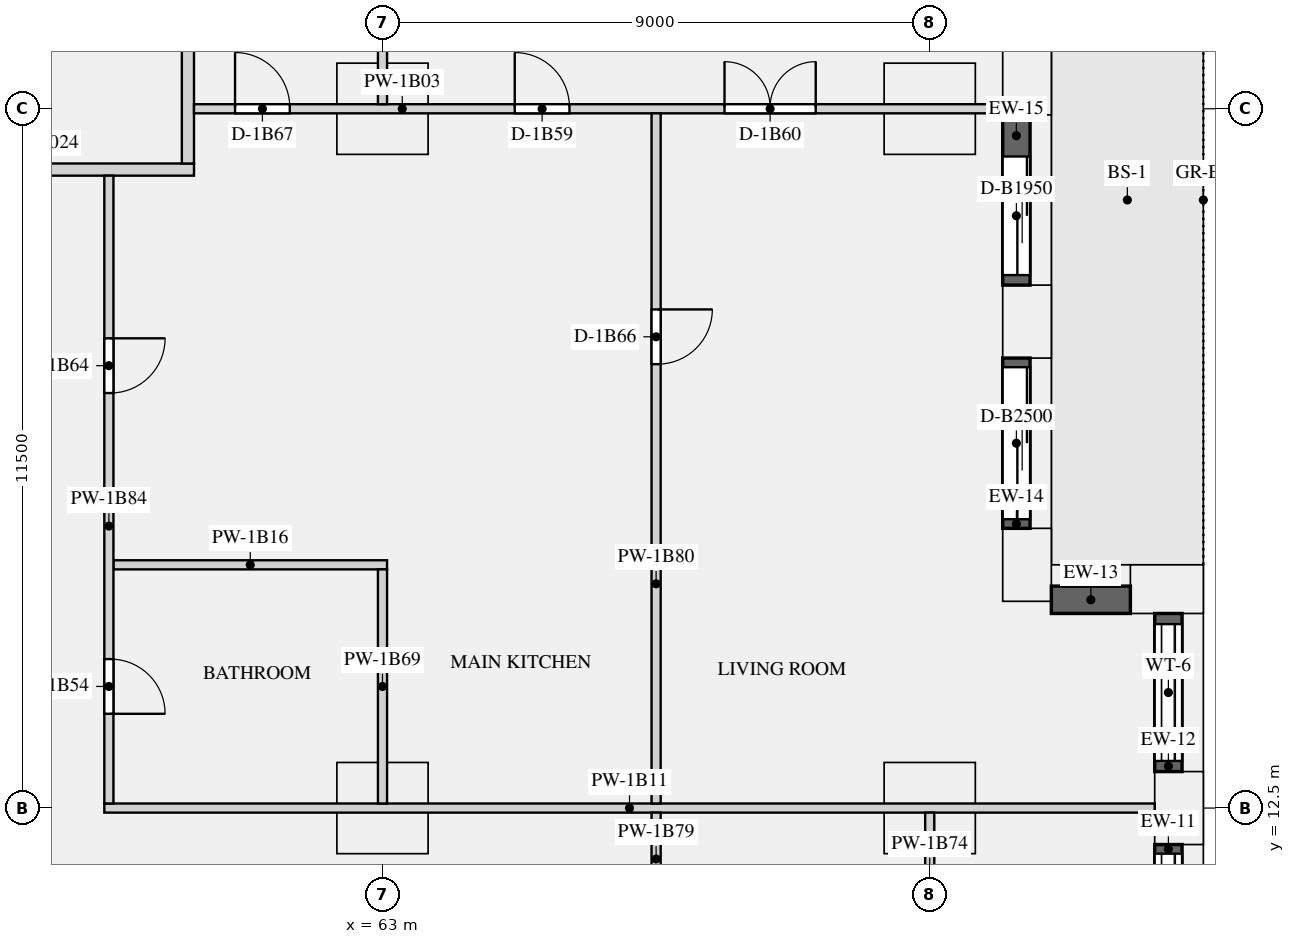
"""IFC4 building model, lengths in metres.
Left out: names, types, materials, properties, quantities, classifications, styles, units other than length and angle.
Written with IfcOpenShell. Run it as: python <this file> out.ifc"""

import sys

from ifc_helpers import new_model, si_unit, direction, frame, frame_2d, origin, origin_2d, place, context, subcontext, project, spatial, rectangle, extrude, element, fill, save


model = new_model("IFC4")
c1 = context("Model", 3, precision=1e-05, world=origin(), true_north=direction((0.0, 1.0)))
c2 = subcontext(c1, "Body", "Model", "MODEL_VIEW")
j1 = project(units=[si_unit("LENGTHUNIT", "METRE"), si_unit("PLANEANGLEUNIT", "RADIAN")], contexts=[c1])
p1 = place(None, origin())
s1 = spatial("IfcSite", under=j1, at=p1, CompositionType="ELEMENT")
p2 = place(p1, origin())
s2 = spatial("IfcBuilding", under=s1, at=p2, CompositionType="ELEMENT")
p3 = place(p2, frame((0.0, 0.0, 28.95)))
s3 = spatial("IfcBuildingStorey", under=s2, at=p3, CompositionType="ELEMENT", Elevation=28.95)
for number, where, z_axis, x_axis in (
    (1, (76.1, 12.5, 0.0), (0.0, 0.0, 1.0), (0.0, 1.0, 0.0)),
    (2, (75.9, 16.1, 0.0), (0.0, 0.0, 1.0), (-1.0, 0.0, 0.0)),
    (3, (73.6, 16.5, 0.0), (0.0, 0.0, 1.0), (0.0, 1.0, 0.0)),
    (4, (73.6, 20.5, 0.0), (0.0, 0.0, 1.0), (0.0, 1.0, 0.0)),
    (5, (73.6, 24.5, 0.0), (0.0, 0.0, 1.0), (0.0, 1.0, 0.0)),
):
    element("IfcColumn", number, at=place(p3, frame(where, z_axis=z_axis, x_axis=x_axis)), inside=s3, PredefinedType="USERDEFINED", context=c2, shape_type="SweptSolid", body=[
        extrude(rectangle(XDim=1.2, YDim=0.8, at=origin_2d()), origin(), (0.0, 0.0, 1.0), 3.15),
    ])
for number, where, z_axis, x_axis in (
    (6, (63.0, 24.0, 0.0), (0.0, 0.0, 1.0), (1.0, 0.0, 0.0)),
    (7, (72.0, 24.0, 0.0), (0.0, 0.0, 1.0), (1.0, 0.0, 0.0)),
    (8, (63.0, 12.5, 0.0), (0.0, 0.0, 1.0), (1.0, 0.0, 0.0)),
    (9, (72.0, 12.5, 0.0), (0.0, 0.0, 1.0), (1.0, 0.0, 0.0)),
):
    element("IfcColumn", number, at=place(p3, frame(where, z_axis=z_axis, x_axis=x_axis)), inside=s3, PredefinedType="COLUMN", context=c2, shape_type="SweptSolid", body=[
        extrude(rectangle(XDim=1.5, YDim=1.5, at=origin_2d()), origin(), (0.0, 0.0, 1.0), 3.15),
    ])
p4 = place(p3, frame((75.925, 9.1, 0.9), z_axis=(0.0, 0.0, 1.0), x_axis=(0.0, 1.0, 0.0)))
e10 = element("IfcWall", 10, at=p4, inside=s3, PredefinedType="SOLIDWALL", context=c2, shape_type="SweptSolid", body=[
    extrude(rectangle(XDim=2.8, YDim=0.45, at=frame_2d((1.4, 0.0))), origin(), (0.0, 0.0, 1.0), 1.93),
])
p5 = place(p4, frame((0.15, 0.0, 0.15)))
e11 = element("IfcOpeningElement", 11, at=p5, cuts=e10, PredefinedType="OPENING", context=c2, shape_type="SweptSolid", body=[
    extrude(rectangle(XDim=2.5, YDim=1.5, at=frame_2d((1.25, 0.75))), frame((0.0, 0.235, 0.0), z_axis=(0.0, -1.0, 0.0), x_axis=(1.0, 0.0, 0.0)), (0.0, 0.0, 1.0), 0.47),
])
p6 = place(p3, frame((75.925, 13.1, 0.9), z_axis=(0.0, 0.0, 1.0), x_axis=(0.0, 1.0, 0.0)))
e12 = element("IfcWall", 12, at=p6, inside=s3, PredefinedType="SOLIDWALL", context=c2, shape_type="SweptSolid", body=[
    extrude(rectangle(XDim=2.6, YDim=0.45, at=frame_2d((1.3, 0.0))), origin(), (0.0, 0.0, 1.0), 1.93),
])
p7 = place(p6, frame((0.175, 0.0, 0.15)))
e13 = element("IfcOpeningElement", 13, at=p7, cuts=e12, PredefinedType="OPENING", context=c2, shape_type="SweptSolid", body=[
    extrude(rectangle(XDim=2.25, YDim=1.5, at=frame_2d((1.125, 0.75))), frame((0.0, 0.235, 0.0), z_axis=(0.0, -1.0, 0.0), x_axis=(1.0, 0.0, 0.0)), (0.0, 0.0, 1.0), 0.47),
])
p8 = place(p3, frame((75.3, 15.925, 0.9), z_axis=(0.0, 0.0, 1.0), x_axis=(-1.0, 0.0, 0.0)))
e14 = element("IfcWall", 14, at=p8, inside=s3, PredefinedType="SOLIDWALL", context=c2, shape_type="SweptSolid", body=[
    extrude(rectangle(XDim=1.3, YDim=0.45, at=frame_2d((0.65, 0.0))), origin(), (0.0, 0.0, 1.0), 1.93),
])
p9 = place(p3, frame((73.425, 17.1, 0.0), z_axis=(0.0, 0.0, 1.0), x_axis=(0.0, 1.0, 0.0)))
e15 = element("IfcWall", 15, at=p9, inside=s3, PredefinedType="SOLIDWALL", context=c2, shape_type="SweptSolid", body=[
    extrude(rectangle(XDim=2.8, YDim=0.45, at=frame_2d((1.4, 0.0))), origin(), (0.0, 0.0, 1.0), 2.83),
])
p10 = place(p9, frame((0.15, 0.0, 0.0)))
e16 = element("IfcOpeningElement", 16, at=p10, cuts=e15, PredefinedType="OPENING", context=c2, shape_type="SweptSolid", body=[
    extrude(rectangle(XDim=2.5, YDim=2.3, at=frame_2d((1.25, 1.15))), frame((0.0, 0.235, 0.0), z_axis=(0.0, -1.0, 0.0), x_axis=(1.0, 0.0, 0.0)), (0.0, 0.0, 1.0), 0.47),
])
p11 = place(p3, frame((73.425, 21.1, 0.0), z_axis=(0.0, 0.0, 1.0), x_axis=(0.0, 1.0, 0.0)))
e17 = element("IfcWall", 17, at=p11, inside=s3, PredefinedType="SOLIDWALL", context=c2, shape_type="SweptSolid", body=[
    extrude(rectangle(XDim=2.8, YDim=0.45, at=frame_2d((1.4, 0.0))), origin(), (0.0, 0.0, 1.0), 2.83),
])
p12 = place(p11, frame((0.165, 0.0, 0.0)))
e18 = element("IfcOpeningElement", 18, at=p12, cuts=e17, PredefinedType="OPENING", context=c2, shape_type="SweptSolid", body=[
    extrude(rectangle(XDim=1.95, YDim=2.3, at=frame_2d((0.975, 1.15))), frame((0.0, 0.235, 0.0), z_axis=(0.0, -1.0, 0.0), x_axis=(1.0, 0.0, 0.0)), (0.0, 0.0, 1.0), 0.47),
])
p13 = place(p3, frame((54.9, 23.0, 0.0), z_axis=(0.0, 0.0, 1.0), x_axis=(1.0, 0.0, 0.0)))
e19 = element("IfcWall", 19, at=p13, inside=s3, PredefinedType="PARTITIONING", context=c2, shape_type="SweptSolid", body=[
    extrude(rectangle(XDim=5.0, YDim=0.2, at=frame_2d((2.5, 0.0))), origin(), (0.0, 0.0, 1.0), 2.83),
])
p14 = place(p3, frame((59.8, 23.1, 0.0), z_axis=(0.0, 0.0, 1.0), x_axis=(0.0, 1.0, 0.0)))
e20 = element("IfcWall", 20, at=p14, inside=s3, PredefinedType="PARTITIONING", context=c2, shape_type="SweptSolid", body=[
    extrude(rectangle(XDim=3.9, YDim=0.2, at=frame_2d((1.95, 0.0))), origin(), (0.0, 0.0, 1.0), 2.83),
])
p15 = place(p3, frame((59.9, 24.0, 0.0), z_axis=(0.0, 0.0, 1.0), x_axis=(1.0, 0.0, 0.0)))
e21 = element("IfcWall", 21, at=p15, inside=s3, PredefinedType="PARTITIONING", context=c2, shape_type="SweptSolid", body=[
    extrude(rectangle(XDim=13.3, YDim=0.15, at=frame_2d((6.65, 0.0))), origin(), (0.0, 0.0, 1.0), 2.83),
])
p16 = place(p15, frame((5.275, 0.0, 0.0)))
e22 = element("IfcOpeningElement", 22, at=p16, cuts=e21, PredefinedType="OPENING", context=c2, shape_type="SweptSolid", body=[
    extrude(rectangle(XDim=0.9, YDim=2.1, at=frame_2d((0.45, 1.05))), frame((0.0, 0.085, 0.0), z_axis=(0.0, -1.0, 0.0), x_axis=(1.0, 0.0, 0.0)), (0.0, 0.0, 1.0), 0.17),
])
p17 = place(p15, frame((8.725, 0.0, 0.0)))
e23 = element("IfcOpeningElement", 23, at=p17, cuts=e21, PredefinedType="OPENING", context=c2, shape_type="SweptSolid", body=[
    extrude(rectangle(XDim=1.5, YDim=2.1, at=frame_2d((0.75, 1.05))), frame((0.0, 0.085, 0.0), z_axis=(0.0, -1.0, 0.0), x_axis=(1.0, 0.0, 0.0)), (0.0, 0.0, 1.0), 0.17),
])
p18 = place(p15, frame((0.675, 0.0, 0.0)))
e24 = element("IfcOpeningElement", 24, at=p18, cuts=e21, PredefinedType="OPENING", context=c2, shape_type="SweptSolid", body=[
    extrude(rectangle(XDim=0.9, YDim=2.1, at=frame_2d((0.45, 1.05))), frame((0.0, 0.085, 0.0), z_axis=(0.0, -1.0, 0.0), x_axis=(1.0, 0.0, 0.0)), (0.0, 0.0, 1.0), 0.17),
])
p19 = place(p3, frame((58.425, 12.5, 0.0), z_axis=(0.0, 0.0, 1.0), x_axis=(1.0, 0.0, 0.0)))
e25 = element("IfcWall", 25, at=p19, inside=s3, PredefinedType="PARTITIONING", context=c2, shape_type="SweptSolid", body=[
    extrude(rectangle(XDim=17.275, YDim=0.15, at=frame_2d((8.637, 0.0))), origin(), (0.0, 0.0, 1.0), 2.83),
])
p20 = place(p3, frame((58.575, 16.5, 0.0), z_axis=(0.0, 0.0, 1.0), x_axis=(1.0, 0.0, 0.0)))
e26 = element("IfcWall", 26, at=p20, inside=s3, PredefinedType="PARTITIONING", context=c2, shape_type="SweptSolid", body=[
    extrude(rectangle(XDim=4.5, YDim=0.15, at=frame_2d((2.25, 0.0))), origin(), (0.0, 0.0, 1.0), 2.83),
])
p21 = place(p3, frame((63.0, 12.575, 0.0), z_axis=(0.0, 0.0, 1.0), x_axis=(0.0, 1.0, 0.0)))
e27 = element("IfcWall", 27, at=p21, inside=s3, PredefinedType="PARTITIONING", context=c2, shape_type="SweptSolid", body=[
    extrude(rectangle(XDim=3.85, YDim=0.15, at=frame_2d((1.925, 0.0))), origin(), (0.0, 0.0, 1.0), 2.83),
])
p22 = place(p3, frame((63.0, 24.075, 0.0), z_axis=(0.0, 0.0, 1.0), x_axis=(0.0, 1.0, 0.0)))
e28 = element("IfcWall", 28, at=p22, inside=s3, PredefinedType="PARTITIONING", context=c2, shape_type="SweptSolid", body=[
    extrude(rectangle(XDim=4.35, YDim=0.15, at=frame_2d((2.175, 0.0))), origin(), (0.0, 0.0, 1.0), 2.83),
])
p23 = place(p22, frame((2.1, 0.0, 0.0)))
e29 = element("IfcOpeningElement", 29, at=p23, cuts=e28, PredefinedType="OPENING", context=c2, shape_type="SweptSolid", body=[
    extrude(rectangle(XDim=0.9, YDim=2.1, at=frame_2d((0.45, 1.05))), frame((0.0, 0.085, 0.0), z_axis=(0.0, -1.0, 0.0), x_axis=(1.0, 0.0, 0.0)), (0.0, 0.0, 1.0), 0.17),
])
p24 = place(p3, frame((72.0, 8.575, 0.0), z_axis=(0.0, 0.0, 1.0), x_axis=(0.0, 1.0, 0.0)))
e30 = element("IfcWall", 30, at=p24, inside=s3, PredefinedType="PARTITIONING", context=c2, shape_type="SweptSolid", body=[
    extrude(rectangle(XDim=3.85, YDim=0.15, at=frame_2d((1.925, 0.0))), origin(), (0.0, 0.0, 1.0), 2.83),
])
p25 = place(p24, frame((1.15, 0.0, 0.0)))
e31 = element("IfcOpeningElement", 31, at=p25, cuts=e30, PredefinedType="OPENING", context=c2, shape_type="SweptSolid", body=[
    extrude(rectangle(XDim=0.8, YDim=2.1, at=frame_2d((0.4, 1.05))), frame((0.0, 0.085, 0.0), z_axis=(0.0, -1.0, 0.0), x_axis=(1.0, 0.0, 0.0)), (0.0, 0.0, 1.0), 0.17),
])
p26 = place(p3, frame((67.5, 8.575, 0.0), z_axis=(0.0, 0.0, 1.0), x_axis=(0.0, 1.0, 0.0)))
e32 = element("IfcWall", 32, at=p26, inside=s3, PredefinedType="PARTITIONING", context=c2, shape_type="SweptSolid", body=[
    extrude(rectangle(XDim=3.85, YDim=0.15, at=frame_2d((1.925, 0.0))), origin(), (0.0, 0.0, 1.0), 2.83),
])
p27 = place(p26, frame((1.525, 0.0, 0.0)))
e33 = element("IfcOpeningElement", 33, at=p27, cuts=e32, PredefinedType="OPENING", context=c2, shape_type="SweptSolid", body=[
    extrude(rectangle(XDim=0.8, YDim=2.1, at=frame_2d((0.4, 1.05))), frame((0.0, 0.085, 0.0), z_axis=(0.0, -1.0, 0.0), x_axis=(1.0, 0.0, 0.0)), (0.0, 0.0, 1.0), 0.17),
])
p28 = place(p3, frame((67.5, 12.575, 0.0), z_axis=(0.0, 0.0, 1.0), x_axis=(0.0, 1.0, 0.0)))
e34 = element("IfcWall", 34, at=p28, inside=s3, PredefinedType="PARTITIONING", context=c2, shape_type="SweptSolid", body=[
    extrude(rectangle(XDim=11.35, YDim=0.15, at=frame_2d((5.675, 0.0))), origin(), (0.0, 0.0, 1.0), 2.83),
])
p29 = place(p28, frame((7.225, 0.0, 0.0)))
e35 = element("IfcOpeningElement", 35, at=p29, cuts=e34, PredefinedType="OPENING", context=c2, shape_type="SweptSolid", body=[
    extrude(rectangle(XDim=0.9, YDim=2.1, at=frame_2d((0.45, 1.05))), frame((0.0, 0.085, 0.0), z_axis=(0.0, -1.0, 0.0), x_axis=(1.0, 0.0, 0.0)), (0.0, 0.0, 1.0), 0.17),
])
p30 = place(p3, frame((58.5, 12.575, 0.0), z_axis=(0.0, 0.0, 1.0), x_axis=(0.0, 1.0, 0.0)))
e36 = element("IfcWall", 36, at=p30, inside=s3, PredefinedType="PARTITIONING", context=c2, shape_type="SweptSolid", body=[
    extrude(rectangle(XDim=10.325, YDim=0.15, at=frame_2d((5.163, 0.0))), origin(), (0.0, 0.0, 1.0), 2.83),
])
p31 = place(p30, frame((1.475, 0.0, 0.0)))
e37 = element("IfcOpeningElement", 37, at=p31, cuts=e36, PredefinedType="OPENING", context=c2, shape_type="SweptSolid", body=[
    extrude(rectangle(XDim=0.9, YDim=2.1, at=frame_2d((0.45, 1.05))), frame((0.0, 0.085, 0.0), z_axis=(0.0, -1.0, 0.0), x_axis=(1.0, 0.0, 0.0)), (0.0, 0.0, 1.0), 0.17),
])
p32 = place(p30, frame((6.75, 0.0, 0.0)))
e38 = element("IfcOpeningElement", 38, at=p32, cuts=e36, PredefinedType="OPENING", context=c2, shape_type="SweptSolid", body=[
    extrude(rectangle(XDim=0.9, YDim=2.1, at=frame_2d((0.45, 1.05))), frame((0.0, 0.085, 0.0), z_axis=(0.0, -1.0, 0.0), x_axis=(1.0, 0.0, 0.0)), (0.0, 0.0, 1.0), 0.17),
])
p33 = place(p5, origin())
e39 = element("IfcWindow", 39, at=p33, inside=s3, PartitioningType="SINGLE_PANEL", PredefinedType="WINDOW", context=c2, shape_type="SweptSolid", body=[
    extrude(rectangle(XDim=2.5, YDim=1.5, at=frame_2d((1.25, 0.75))), frame((0.0, -0.065, 0.0), z_axis=(0.0, -1.0, 0.0), x_axis=(1.0, 0.0, 0.0)), (0.0, 0.0, 1.0), 0.06),
])
fill(e11, e39)
p34 = place(p7, origin())
e40 = element("IfcWindow", 40, at=p34, inside=s3, PartitioningType="SINGLE_PANEL", PredefinedType="WINDOW", context=c2, shape_type="SweptSolid", body=[
    extrude(rectangle(XDim=2.25, YDim=1.5, at=frame_2d((1.125, 0.75))), frame((0.0, -0.065, 0.0), z_axis=(0.0, -1.0, 0.0), x_axis=(1.0, 0.0, 0.0)), (0.0, 0.0, 1.0), 0.06),
])
fill(e13, e40)
p35 = place(p10, origin())
e41 = element("IfcDoor", 41, at=p35, inside=s3, OperationType="SLIDING_TO_LEFT", PredefinedType="DOOR", context=c2, shape_type="SweptSolid", body=[
    extrude(rectangle(XDim=2.5, YDim=2.3, at=frame_2d((1.25, 1.15))), frame((0.0, -0.07, 0.0), z_axis=(0.0, -1.0, 0.0), x_axis=(1.0, 0.0, 0.0)), (0.0, 0.0, 1.0), 0.05),
])
fill(e16, e41)
p36 = place(p12, origin())
e42 = element("IfcDoor", 42, at=p36, inside=s3, OperationType="SLIDING_TO_LEFT", PredefinedType="DOOR", context=c2, shape_type="SweptSolid", body=[
    extrude(rectangle(XDim=1.95, YDim=2.3, at=frame_2d((0.975, 1.15))), frame((0.0, -0.07, 0.0), z_axis=(0.0, -1.0, 0.0), x_axis=(1.0, 0.0, 0.0)), (0.0, 0.0, 1.0), 0.05),
])
fill(e18, e42)
p37 = place(p31, frame((0.9, 0.0, 0.0), z_axis=(0.0, 0.0, 1.0), x_axis=(-1.0, 0.0, 0.0)))
e43 = element("IfcDoor", 43, at=p37, inside=s3, OperationType="SINGLE_SWING_RIGHT", PredefinedType="DOOR", context=c2, shape_type="SweptSolid", body=[
    extrude(rectangle(XDim=0.9, YDim=2.1, at=frame_2d((0.45, 1.05))), frame((0.0, 0.025, 0.0), z_axis=(0.0, -1.0, 0.0), x_axis=(1.0, 0.0, 0.0)), (0.0, 0.0, 1.0), 0.05),
])
fill(e37, e43)
p38 = place(p16, origin())
e44 = element("IfcDoor", 44, at=p38, inside=s3, OperationType="SINGLE_SWING_LEFT", PredefinedType="DOOR", context=c2, shape_type="SweptSolid", body=[
    extrude(rectangle(XDim=0.9, YDim=2.1, at=frame_2d((0.45, 1.05))), frame((0.0, 0.025, 0.0), z_axis=(0.0, -1.0, 0.0), x_axis=(1.0, 0.0, 0.0)), (0.0, 0.0, 1.0), 0.05),
])
fill(e22, e44)
p39 = place(p17, origin())
e45 = element("IfcDoor", 45, at=p39, inside=s3, OperationType="DOUBLE_DOOR_SINGLE_SWING", PredefinedType="DOOR", context=c2, shape_type="SweptSolid", body=[
    extrude(rectangle(XDim=1.5, YDim=2.1, at=frame_2d((0.75, 1.05))), frame((0.0, 0.025, 0.0), z_axis=(0.0, -1.0, 0.0), x_axis=(1.0, 0.0, 0.0)), (0.0, 0.0, 1.0), 0.05),
])
fill(e23, e45)
p40 = place(p32, frame((0.9, 0.0, 0.0), z_axis=(0.0, 0.0, 1.0), x_axis=(-1.0, 0.0, 0.0)))
e46 = element("IfcDoor", 46, at=p40, inside=s3, OperationType="SINGLE_SWING_LEFT", PredefinedType="DOOR", context=c2, shape_type="SweptSolid", body=[
    extrude(rectangle(XDim=0.9, YDim=2.1, at=frame_2d((0.45, 1.05))), frame((0.0, 0.025, 0.0), z_axis=(0.0, -1.0, 0.0), x_axis=(1.0, 0.0, 0.0)), (0.0, 0.0, 1.0), 0.05),
])
fill(e38, e46)
p41 = place(p29, frame((0.9, 0.0, 0.0), z_axis=(0.0, 0.0, 1.0), x_axis=(-1.0, 0.0, 0.0)))
e47 = element("IfcDoor", 47, at=p41, inside=s3, OperationType="SINGLE_SWING_LEFT", PredefinedType="DOOR", context=c2, shape_type="SweptSolid", body=[
    extrude(rectangle(XDim=0.9, YDim=2.1, at=frame_2d((0.45, 1.05))), frame((0.0, 0.025, 0.0), z_axis=(0.0, -1.0, 0.0), x_axis=(1.0, 0.0, 0.0)), (0.0, 0.0, 1.0), 0.05),
])
fill(e35, e47)
p42 = place(p18, origin())
e48 = element("IfcDoor", 48, at=p42, inside=s3, OperationType="SINGLE_SWING_LEFT", PredefinedType="DOOR", context=c2, shape_type="SweptSolid", body=[
    extrude(rectangle(XDim=0.9, YDim=2.1, at=frame_2d((0.45, 1.05))), frame((0.0, 0.025, 0.0), z_axis=(0.0, -1.0, 0.0), x_axis=(1.0, 0.0, 0.0)), (0.0, 0.0, 1.0), 0.05),
])
fill(e24, e48)
save(model, sys.argv[1])
